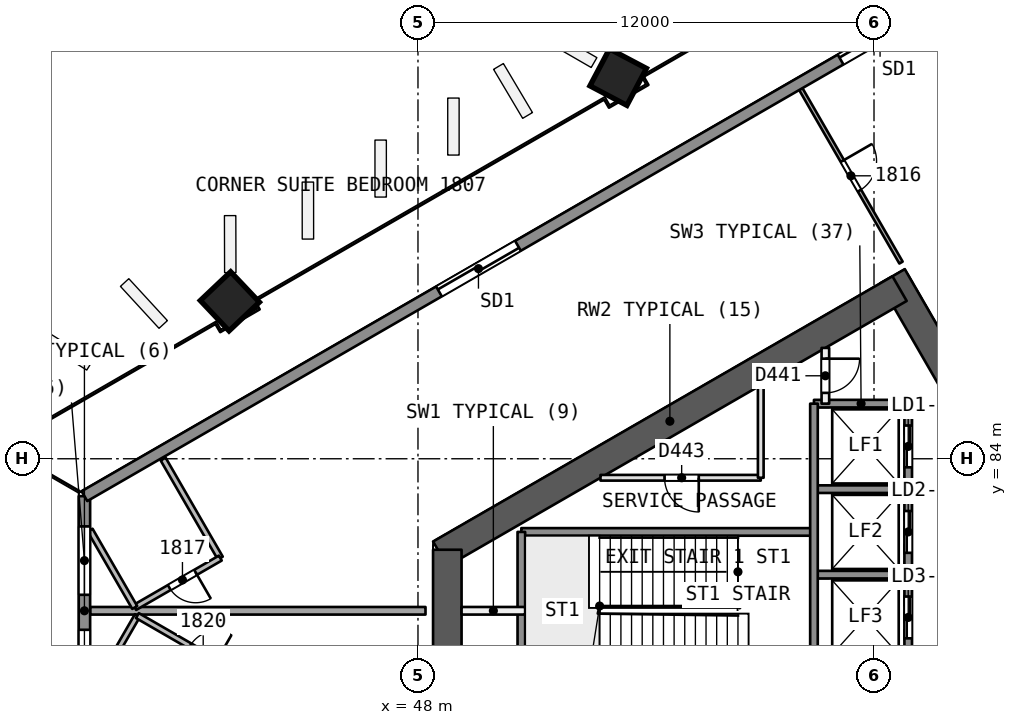
"""IFC4 building model, lengths in metres.
Left out: names, types, materials, properties, quantities, classifications, styles, units other than length and angle.
Written with IfcOpenShell. Run it as: python <this file> out.ifc"""

import sys

from ifc_helpers import new_model, si_unit, direction, frame, frame_2d, origin, origin_2d, place, context, subcontext, project, spatial, rectangle, extrude, element, fill, save


model = new_model("IFC4")
c1 = context("Model", 3, precision=1e-05, world=origin(), true_north=direction((0.0, 1.0)))
c2 = subcontext(c1, "Body", "Model", "MODEL_VIEW")
j1 = project(units=[si_unit("LENGTHUNIT", "METRE"), si_unit("PLANEANGLEUNIT", "RADIAN")], contexts=[c1])
p1 = place(None, origin())
s1 = spatial("IfcSite", under=j1, at=p1, CompositionType="ELEMENT")
p2 = place(p1, origin())
s2 = spatial("IfcBuilding", under=s1, at=p2, CompositionType="ELEMENT")
p3 = place(p2, frame((0.0, 0.0, 79.5)))
s3 = spatial("IfcBuildingStorey", under=s2, at=p3, CompositionType="ELEMENT", Elevation=79.5)
p4 = place(p3, frame((65.567, 80.0, 0.0), z_axis=(0.0, 0.0, 1.0), x_axis=(-0.499988615364, 0.866031976607, 0.0)))
e1 = element("IfcWall", 1, at=p4, inside=s3, PredefinedType="SHEAR", context=c2, shape_type="SweptSolid", body=[
    extrude(rectangle(XDim=10.163, YDim=0.75, at=frame_2d((5.082, 0.0))), origin(), (0.0, 0.0, 1.0), 3.7),
])
p5 = place(p4, frame((0.733, 0.0, 0.0)))
e2 = element("IfcOpeningElement", 2, at=p5, cuts=e1, PredefinedType="OPENING", context=c2, shape_type="SweptSolid", body=[
    extrude(rectangle(XDim=1.2, YDim=2.1, at=frame_2d((0.6, 1.05))), frame((0.0, 0.385, 0.0), z_axis=(0.0, -1.0, 0.0), x_axis=(1.0, 0.0, 0.0)), (0.0, 0.0, 1.0), 0.771),
])
p6 = place(p3, frame((60.673, 88.477, 0.0), z_axis=(0.0, 0.0, 1.0), x_axis=(-0.8660248072, -0.500001033313, 0.0)))
e3 = element("IfcWall", 3, at=p6, inside=s3, PredefinedType="SHEAR", context=c2, shape_type="SweptSolid", body=[
    extrude(rectangle(XDim=13.958, YDim=0.75, at=frame_2d((6.979, 0.0))), origin(), (0.0, 0.0, 1.0), 3.7),
])
p7 = place(p3, frame((48.772, 81.606, 0.0), z_axis=(0.0, 0.0, 1.0), x_axis=(0.0, -1.0, 0.0)))
e4 = element("IfcWall", 4, at=p7, inside=s3, PredefinedType="SHEAR", context=c2, shape_type="SweptSolid", body=[
    extrude(rectangle(XDim=3.429, YDim=0.75, at=frame_2d((1.714, 0.0))), origin(), (0.0, 0.0, 1.0), 3.7),
])
p8 = place(p3, frame((60.673, 71.523, 0.0), z_axis=(0.0, 0.0, 1.0), x_axis=(0.499997052475, 0.866027105532, 0.0)))
e5 = element("IfcWall", 5, at=p8, inside=s3, PredefinedType="SHEAR", context=c2, shape_type="SweptSolid", body=[
    extrude(rectangle(XDim=10.005, YDim=0.75, at=frame_2d((5.002, 0.0))), origin(), (0.0, 0.0, 1.0), 3.7),
])
p9 = place(p8, frame((7.855, 0.0, 0.0)))
e6 = element("IfcOpeningElement", 6, at=p9, cuts=e5, PredefinedType="OPENING", context=c2, shape_type="SweptSolid", body=[
    extrude(rectangle(XDim=1.2, YDim=2.1, at=frame_2d((0.6, 1.05))), frame((0.0, 0.385, 0.0), z_axis=(0.0, -1.0, 0.0), x_axis=(1.0, 0.0, 0.0)), (0.0, 0.0, 1.0), 0.771),
])
p10 = place(p3, frame((53.245, 94.056, 0.0), z_axis=(0.019328516974, -0.012138044789, 0.999739504221), x_axis=(-0.500214302693, 0.865666432488, 0.020181155676)))
e7 = element("IfcColumn", 7, at=p10, inside=s3, PredefinedType="COLUMN", context=c2, shape_type="SweptSolid", body=[
    extrude(rectangle(XDim=1.1, YDim=1.1, at=origin_2d()), origin(), (0.0, 0.0, 1.0), 3.701),
])
p11 = place(p3, frame((43.015, 88.15, 0.0), z_axis=(0.028559101991, -0.006859460986, 0.999568569678), x_axis=(-0.49850746064, 0.866650252321, 0.020190389752)))
e8 = element("IfcColumn", 8, at=p11, inside=s3, PredefinedType="COLUMN", context=c2, shape_type="SweptSolid", body=[
    extrude(rectangle(XDim=1.1, YDim=1.1, at=origin_2d()), origin(), (0.0, 0.0, 1.0), 3.702),
])
p12 = place(p3, frame((58.074, 93.728, 0.0), z_axis=(0.0, 0.0, 1.0), x_axis=(0.499973627007, -0.866040629704, 0.0)))
e9 = element("IfcWall", 9, at=p12, inside=s3, PredefinedType="PARTITIONING", context=c2, shape_type="SweptSolid", body=[
    extrude(rectangle(XDim=5.273, YDim=0.1, at=frame_2d((2.636, 0.0))), origin(), (0.0, 0.0, 1.0), 3.2),
])
p13 = place(p12, frame((2.186, 0.0, 0.0)))
e10 = element("IfcOpeningElement", 10, at=p13, cuts=e9, PredefinedType="OPENING", context=c2, shape_type="SweptSolid", body=[
    extrude(rectangle(XDim=0.9, YDim=2.1, at=frame_2d((0.45, 1.05))), frame((0.0, 0.061, 0.0), z_axis=(0.0, -1.0, 0.0), x_axis=(1.0, 0.0, 0.0)), (0.0, 0.0, 1.0), 0.121),
])
p14 = place(p3, frame((41.294, 83.992, 0.0), z_axis=(0.0, 0.0, 1.0), x_axis=(0.500022102064, -0.866012642776, 0.0)))
e11 = element("IfcWall", 11, at=p14, inside=s3, PredefinedType="PARTITIONING", context=c2, shape_type="SweptSolid", body=[
    extrude(rectangle(XDim=3.009, YDim=0.15, at=frame_2d((1.504, 0.0))), origin(), (0.0, 0.0, 1.0), 3.2),
])
p15 = place(p3, frame((42.798, 81.386, 0.0), z_axis=(0.0, 0.0, 1.0), x_axis=(-0.866021400173, -0.500006934395, 0.0)))
e12 = element("IfcWall", 12, at=p15, inside=s3, PredefinedType="PARTITIONING", context=c2, shape_type="SweptSolid", body=[
    extrude(rectangle(XDim=2.6, YDim=0.15, at=frame_2d((1.3, 0.0))), origin(), (0.0, 0.0, 1.0), 3.2),
])
p16 = place(p15, frame((0.75, 0.0, 0.0)))
e13 = element("IfcOpeningElement", 13, at=p16, cuts=e12, PredefinedType="OPENING", context=c2, shape_type="SweptSolid", body=[
    extrude(rectangle(XDim=0.8, YDim=2.1, at=frame_2d((0.4, 1.05))), frame((0.0, 0.085, 0.0), z_axis=(0.0, -1.0, 0.0), x_axis=(1.0, 0.0, 0.0)), (0.0, 0.0, 1.0), 0.171),
])
p17 = place(p3, frame((40.547, 80.086, 0.0), z_axis=(0.0, 0.0, 1.0), x_axis=(-0.499983284935, 0.866035054017, 0.0)))
e14 = element("IfcWall", 14, at=p17, inside=s3, PredefinedType="PARTITIONING", context=c2, shape_type="SweptSolid", body=[
    extrude(rectangle(XDim=2.35, YDim=0.15, at=frame_2d((1.175, 0.0))), origin(), (0.0, 0.0, 1.0), 3.2),
])
p18 = place(p3, frame((39.372, 80.0, 0.0), z_axis=(0.0, 0.0, 1.0), x_axis=(1.0, 0.0, 0.0)))
e15 = element("IfcWall", 15, at=p18, inside=s3, PredefinedType="PARTITIONING", context=c2, shape_type="SweptSolid", body=[
    extrude(rectangle(XDim=8.826, YDim=0.2, at=frame_2d((4.413, 0.0))), origin(), (0.0, 0.0, 1.0), 3.2),
])
p19 = place(p3, frame((39.372, 77.718, 0.0), z_axis=(0.0, 0.0, 1.0), x_axis=(0.499968694491, 0.866043477274, 0.0)))
e16 = element("IfcWall", 16, at=p19, inside=s3, PredefinedType="PARTITIONING", context=c2, shape_type="SweptSolid", body=[
    extrude(rectangle(XDim=2.489, YDim=0.15, at=frame_2d((1.245, 0.0))), origin(), (0.0, 0.0, 1.0), 3.2),
])
p20 = place(p3, frame((40.616, 79.873, 0.0), z_axis=(0.0, 0.0, 1.0), x_axis=(0.866021400173, -0.500006934395, 0.0)))
e17 = element("IfcWall", 17, at=p20, inside=s3, PredefinedType="PARTITIONING", context=c2, shape_type="SweptSolid", body=[
    extrude(rectangle(XDim=2.6, YDim=0.15, at=frame_2d((1.3, 0.0))), origin(), (0.0, 0.0, 1.0), 3.2),
])
p21 = place(p20, frame((1.6, 0.0, 0.0)))
e18 = element("IfcOpeningElement", 18, at=p21, cuts=e17, PredefinedType="OPENING", context=c2, shape_type="SweptSolid", body=[
    extrude(rectangle(XDim=0.8, YDim=2.1, at=frame_2d((0.4, 1.05))), frame((0.0, 0.085, 0.0), z_axis=(0.0, -1.0, 0.0), x_axis=(1.0, 0.0, 0.0)), (0.0, 0.0, 1.0), 0.171),
])
p22 = place(p3, frame((39.223, 76.984, 0.0), z_axis=(0.0, 0.0, 1.0), x_axis=(0.0, 1.0, 0.0)))
e19 = element("IfcWall", 19, at=p22, inside=s3, PredefinedType="SOLIDWALL", context=c2, shape_type="SweptSolid", body=[
    extrude(rectangle(XDim=6.032, YDim=0.3, at=frame_2d((3.016, 0.0))), origin(), (0.0, 0.0, 1.0), 3.2),
])
p23 = place(p22, frame((3.437, 0.0, 0.9)))
e20 = element("IfcOpeningElement", 20, at=p23, cuts=e19, PredefinedType="OPENING", context=c2, shape_type="SweptSolid", body=[
    extrude(rectangle(XDim=1.8, YDim=1.5, at=frame_2d((0.9, 0.75))), frame((0.0, 0.161, 0.0), z_axis=(0.0, -1.0, 0.0), x_axis=(1.0, 0.0, 0.0)), (0.0, 0.0, 1.0), 0.321),
])
p24 = place(p22, frame((0.716, 0.0, 0.9)))
e21 = element("IfcOpeningElement", 21, at=p24, cuts=e19, PredefinedType="OPENING", context=c2, shape_type="SweptSolid", body=[
    extrude(rectangle(XDim=1.8, YDim=1.5, at=frame_2d((0.9, 0.75))), frame((0.0, 0.161, 0.0), z_axis=(0.0, -1.0, 0.0), x_axis=(1.0, 0.0, 0.0)), (0.0, 0.0, 1.0), 0.321),
])
p25 = place(p3, frame((39.223, 83.016, 0.0), z_axis=(0.0, 0.0, 1.0), x_axis=(0.86602468924, 0.500001237625, 0.0)))
e22 = element("IfcWall", 22, at=p25, inside=s3, PredefinedType="SOLIDWALL", context=c2, shape_type="SweptSolid", body=[
    extrude(rectangle(XDim=58.951, YDim=0.3, at=frame_2d((29.476, 0.0))), origin(), (0.0, 0.0, 1.0), 3.2),
])
p26 = place(p25, frame((28.743, 0.0, 0.0)))
e23 = element("IfcOpeningElement", 23, at=p26, cuts=e22, PredefinedType="OPENING", context=c2, shape_type="SweptSolid", body=[
    extrude(rectangle(XDim=2.4, YDim=2.4, at=frame_2d((1.2, 1.2))), frame((0.0, 0.161, 0.0), z_axis=(0.0, -1.0, 0.0), x_axis=(1.0, 0.0, 0.0)), (0.0, 0.0, 1.0), 0.321),
])
p27 = place(p25, frame((34.043, 0.0, 0.0)))
e24 = element("IfcOpeningElement", 24, at=p27, cuts=e22, PredefinedType="OPENING", context=c2, shape_type="SweptSolid", body=[
    extrude(rectangle(XDim=2.4, YDim=2.4, at=frame_2d((1.2, 1.2))), frame((0.0, 0.161, 0.0), z_axis=(0.0, -1.0, 0.0), x_axis=(1.0, 0.0, 0.0)), (0.0, 0.0, 1.0), 0.321),
])
p28 = place(p25, frame((45.739, 0.0, 0.0)))
e25 = element("IfcOpeningElement", 25, at=p28, cuts=e22, PredefinedType="OPENING", context=c2, shape_type="SweptSolid", body=[
    extrude(rectangle(XDim=2.4, YDim=2.4, at=frame_2d((1.2, 1.2))), frame((0.0, 0.161, 0.0), z_axis=(0.0, -1.0, 0.0), x_axis=(1.0, 0.0, 0.0)), (0.0, 0.0, 1.0), 0.321),
])
p29 = place(p25, frame((22.976, 0.0, 0.0)))
e26 = element("IfcOpeningElement", 26, at=p29, cuts=e22, PredefinedType="OPENING", context=c2, shape_type="SweptSolid", body=[
    extrude(rectangle(XDim=2.4, YDim=2.4, at=frame_2d((1.2, 1.2))), frame((0.0, 0.161, 0.0), z_axis=(0.0, -1.0, 0.0), x_axis=(1.0, 0.0, 0.0)), (0.0, 0.0, 1.0), 0.321),
])
p30 = place(p25, frame((10.773, 0.0, 0.0)))
e27 = element("IfcOpeningElement", 27, at=p30, cuts=e22, PredefinedType="OPENING", context=c2, shape_type="SweptSolid", body=[
    extrude(rectangle(XDim=2.4, YDim=2.4, at=frame_2d((1.2, 1.2))), frame((0.0, 0.161, 0.0), z_axis=(0.0, -1.0, 0.0), x_axis=(1.0, 0.0, 0.0)), (0.0, 0.0, 1.0), 0.321),
])
p31 = place(p3, frame((60.9, 85.45, 0.0), z_axis=(0.0, 0.0, 1.0), x_axis=(-1.0, 0.0, 0.0)))
e28 = element("IfcWall", 28, at=p31, inside=s3, PredefinedType="SOLIDWALL", context=c2, shape_type="SweptSolid", body=[
    extrude(rectangle(XDim=2.48, YDim=0.2, at=frame_2d((1.24, 0.0))), origin(), (0.0, 0.0, 1.0), 3.2),
])
p32 = place(p3, frame((57.02, 83.5, 0.0), z_axis=(0.0, 0.0, 1.0), x_axis=(-1.0, 0.0, 0.0)))
e29 = element("IfcWall", 29, at=p32, inside=s3, PredefinedType="PARTITIONING", context=c2, shape_type="SweptSolid", body=[
    extrude(rectangle(XDim=4.218, YDim=0.15, at=frame_2d((2.109, 0.0))), origin(), (0.0, 0.0, 1.0), 3.2),
])
p33 = place(p32, frame((1.631, 0.0, 0.0)))
e30 = element("IfcOpeningElement", 30, at=p33, cuts=e29, PredefinedType="OPENING", context=c2, shape_type="SweptSolid", body=[
    extrude(rectangle(XDim=0.9, YDim=2.1, at=frame_2d((0.45, 1.05))), frame((0.0, 0.085, 0.0), z_axis=(0.0, -1.0, 0.0), x_axis=(1.0, 0.0, 0.0)), (0.0, 0.0, 1.0), 0.171),
])
p34 = place(p3, frame((60.9, 83.2, 0.0), z_axis=(0.0, 0.0, 1.0), x_axis=(-1.0, 0.0, 0.0)))
e31 = element("IfcWall", 31, at=p34, inside=s3, PredefinedType="SOLIDWALL", context=c2, shape_type="SweptSolid", body=[
    extrude(rectangle(XDim=2.48, YDim=0.2, at=frame_2d((1.24, 0.0))), origin(), (0.0, 0.0, 1.0), 3.2),
])
p35 = place(p3, frame((58.42, 82.075, 0.0), z_axis=(0.0, 0.0, 1.0), x_axis=(-1.0, 0.0, 0.0)))
e32 = element("IfcWall", 32, at=p35, inside=s3, PredefinedType="SOLIDWALL", context=c2, shape_type="SweptSolid", body=[
    extrude(rectangle(XDim=7.7, YDim=0.2, at=frame_2d((3.85, 0.0))), origin(), (0.0, 0.0, 1.0), 3.2),
])
p36 = place(p3, frame((60.9, 80.95, 0.0), z_axis=(0.0, 0.0, 1.0), x_axis=(-1.0, 0.0, 0.0)))
e33 = element("IfcWall", 33, at=p36, inside=s3, PredefinedType="SOLIDWALL", context=c2, shape_type="SweptSolid", body=[
    extrude(rectangle(XDim=2.48, YDim=0.2, at=frame_2d((1.24, 0.0))), origin(), (0.0, 0.0, 1.0), 3.2),
])
p37 = place(p3, frame((50.82, 80.0, 0.0), z_axis=(0.0, 0.0, 1.0), x_axis=(-1.0, 0.0, 0.0)))
e34 = element("IfcWall", 34, at=p37, inside=s3, PredefinedType="PARTITIONING", context=c2, shape_type="SweptSolid", body=[
    extrude(rectangle(XDim=1.673, YDim=0.2, at=frame_2d((0.836, 0.0))), origin(), (0.0, 0.0, 1.0), 3.2),
])
p38 = place(p3, frame((60.9, 85.45, 0.0), z_axis=(0.0, 0.0, 1.0), x_axis=(0.0, -1.0, 0.0)))
e35 = element("IfcWall", 35, at=p38, inside=s3, PredefinedType="SOLIDWALL", context=c2, shape_type="SweptSolid", body=[
    extrude(rectangle(XDim=10.9, YDim=0.2, at=frame_2d((5.45, 0.0))), origin(), (0.0, 0.0, 1.0), 3.2),
])
p39 = place(p38, frame((0.575, 0.0, 0.0)))
e36 = element("IfcOpeningElement", 36, at=p39, cuts=e35, PredefinedType="OPENING", context=c2, shape_type="SweptSolid", body=[
    extrude(rectangle(XDim=1.1, YDim=2.1, at=frame_2d((0.55, 1.05))), frame((0.0, 0.11, 0.0), z_axis=(0.0, -1.0, 0.0), x_axis=(1.0, 0.0, 0.0)), (0.0, 0.0, 1.0), 0.221),
])
p40 = place(p38, frame((2.825, 0.0, 0.0)))
e37 = element("IfcOpeningElement", 37, at=p40, cuts=e35, PredefinedType="OPENING", context=c2, shape_type="SweptSolid", body=[
    extrude(rectangle(XDim=1.1, YDim=2.1, at=frame_2d((0.55, 1.05))), frame((0.0, 0.11, 0.0), z_axis=(0.0, -1.0, 0.0), x_axis=(1.0, 0.0, 0.0)), (0.0, 0.0, 1.0), 0.221),
])
p41 = place(p38, frame((5.075, 0.0, 0.0)))
e38 = element("IfcOpeningElement", 38, at=p41, cuts=e35, PredefinedType="OPENING", context=c2, shape_type="SweptSolid", body=[
    extrude(rectangle(XDim=1.1, YDim=2.1, at=frame_2d((0.55, 1.05))), frame((0.0, 0.11, 0.0), z_axis=(0.0, -1.0, 0.0), x_axis=(1.0, 0.0, 0.0)), (0.0, 0.0, 1.0), 0.221),
])
p42 = place(p38, frame((7.325, 0.0, 0.0)))
e39 = element("IfcOpeningElement", 39, at=p42, cuts=e35, PredefinedType="OPENING", context=c2, shape_type="SweptSolid", body=[
    extrude(rectangle(XDim=1.1, YDim=2.1, at=frame_2d((0.55, 1.05))), frame((0.0, 0.11, 0.0), z_axis=(0.0, -1.0, 0.0), x_axis=(1.0, 0.0, 0.0)), (0.0, 0.0, 1.0), 0.221),
])
p43 = place(p3, frame((58.72, 86.917, 0.0), z_axis=(0.0, 0.0, 1.0), x_axis=(0.0, -1.0, 0.0)))
e40 = element("IfcWall", 40, at=p43, inside=s3, PredefinedType="PARTITIONING", context=c2, shape_type="SweptSolid", body=[
    extrude(rectangle(XDim=1.467, YDim=0.2, at=frame_2d((0.733, 0.0))), origin(), (0.0, 0.0, 1.0), 3.2),
])
p44 = place(p43, frame((0.283, 0.0, 0.0)))
e41 = element("IfcOpeningElement", 41, at=p44, cuts=e40, PredefinedType="OPENING", context=c2, shape_type="SweptSolid", body=[
    extrude(rectangle(XDim=0.9, YDim=2.1, at=frame_2d((0.45, 1.05))), frame((0.0, 0.11, 0.0), z_axis=(0.0, -1.0, 0.0), x_axis=(1.0, 0.0, 0.0)), (0.0, 0.0, 1.0), 0.221),
])
p45 = place(p3, frame((58.42, 85.45, 0.0), z_axis=(0.0, 0.0, 1.0), x_axis=(0.0, -1.0, 0.0)))
e42 = element("IfcWall", 42, at=p45, inside=s3, PredefinedType="SOLIDWALL", context=c2, shape_type="SweptSolid", body=[
    extrude(rectangle(XDim=9.0, YDim=0.2, at=frame_2d((4.5, 0.0))), origin(), (0.0, 0.0, 1.0), 3.2),
])
p46 = place(p3, frame((57.02, 85.935, 0.0), z_axis=(0.0, 0.0, 1.0), x_axis=(0.0, -1.0, 0.0)))
e43 = element("IfcWall", 43, at=p46, inside=s3, PredefinedType="PARTITIONING", context=c2, shape_type="SweptSolid", body=[
    extrude(rectangle(XDim=2.435, YDim=0.15, at=frame_2d((1.218, 0.0))), origin(), (0.0, 0.0, 1.0), 3.2),
])
p47 = place(p3, frame((50.72, 82.075, 0.0), z_axis=(0.0, 0.0, 1.0), x_axis=(0.0, -1.0, 0.0)))
e44 = element("IfcWall", 44, at=p47, inside=s3, PredefinedType="SOLIDWALL", context=c2, shape_type="SweptSolid", body=[
    extrude(rectangle(XDim=4.15, YDim=0.2, at=frame_2d((2.075, 0.0))), origin(), (0.0, 0.0, 1.0), 3.2),
])
p48 = place(p13, origin())
e45 = element("IfcDoor", 45, at=p48, inside=s3, OperationType="SINGLE_SWING_LEFT", PredefinedType="NOTDEFINED", context=c2, shape_type="SweptSolid", body=[
    extrude(rectangle(XDim=0.9, YDim=2.1, at=frame_2d((0.45, 1.05))), frame((0.0, 0.025, 0.0), z_axis=(0.0, -1.0, 0.0), x_axis=(1.0, 0.0, 0.0)), (0.0, 0.0, 1.0), 0.05),
])
fill(e10, e45)
p49 = place(p16, origin())
e46 = element("IfcDoor", 46, at=p49, inside=s3, OperationType="SINGLE_SWING_LEFT", PredefinedType="NOTDEFINED", context=c2, shape_type="SweptSolid", body=[
    extrude(rectangle(XDim=0.8, YDim=2.1, at=frame_2d((0.4, 1.05))), frame((0.0, 0.025, 0.0), z_axis=(0.0, -1.0, 0.0), x_axis=(1.0, 0.0, 0.0)), (0.0, 0.0, 1.0), 0.05),
])
fill(e13, e46)
p50 = place(p23, origin())
e47 = element("IfcWindow", 47, at=p50, inside=s3, PartitioningType="SINGLE_PANEL", PredefinedType="WINDOW", context=c2, shape_type="SweptSolid", body=[
    extrude(rectangle(XDim=1.8, YDim=1.5, at=frame_2d((0.9, 0.75))), frame((0.0, 0.03, 0.0), z_axis=(0.0, -1.0, 0.0), x_axis=(1.0, 0.0, 0.0)), (0.0, 0.0, 1.0), 0.06),
])
fill(e20, e47)
p51 = place(p24, origin())
e48 = element("IfcWindow", 48, at=p51, inside=s3, PartitioningType="SINGLE_PANEL", PredefinedType="WINDOW", context=c2, shape_type="SweptSolid", body=[
    extrude(rectangle(XDim=1.8, YDim=1.5, at=frame_2d((0.9, 0.75))), frame((0.0, 0.03, 0.0), z_axis=(0.0, -1.0, 0.0), x_axis=(1.0, 0.0, 0.0)), (0.0, 0.0, 1.0), 0.06),
])
fill(e21, e48)
p52 = place(p29, origin())
e49 = element("IfcDoor", 49, at=p52, inside=s3, OperationType="SLIDING_TO_RIGHT", PredefinedType="NOTDEFINED", context=c2, shape_type="SweptSolid", body=[
    extrude(rectangle(XDim=2.4, YDim=2.4, at=frame_2d((1.2, 1.2))), frame((0.0, 0.025, 0.0), z_axis=(0.0, -1.0, 0.0), x_axis=(1.0, 0.0, 0.0)), (0.0, 0.0, 1.0), 0.05),
])
fill(e26, e49)
p53 = place(p30, origin())
e50 = element("IfcDoor", 50, at=p53, inside=s3, OperationType="SLIDING_TO_LEFT", PredefinedType="NOTDEFINED", context=c2, shape_type="SweptSolid", body=[
    extrude(rectangle(XDim=2.4, YDim=2.4, at=frame_2d((1.2, 1.2))), frame((0.0, 0.025, 0.0), z_axis=(0.0, -1.0, 0.0), x_axis=(1.0, 0.0, 0.0)), (0.0, 0.0, 1.0), 0.05),
])
fill(e27, e50)
p54 = place(p39, origin())
e51 = element("IfcDoor", 51, at=p54, inside=s3, OperationType="SLIDING_TO_RIGHT", PredefinedType="NOTDEFINED", context=c2, shape_type="SweptSolid", body=[
    extrude(rectangle(XDim=1.1, YDim=2.1, at=frame_2d((0.55, 1.05))), frame((0.0, 0.025, 0.0), z_axis=(0.0, -1.0, 0.0), x_axis=(1.0, 0.0, 0.0)), (0.0, 0.0, 1.0), 0.05),
])
fill(e36, e51)
p55 = place(p40, origin())
e52 = element("IfcDoor", 52, at=p55, inside=s3, OperationType="SLIDING_TO_LEFT", PredefinedType="NOTDEFINED", context=c2, shape_type="SweptSolid", body=[
    extrude(rectangle(XDim=1.1, YDim=2.1, at=frame_2d((0.55, 1.05))), frame((0.0, 0.025, 0.0), z_axis=(0.0, -1.0, 0.0), x_axis=(1.0, 0.0, 0.0)), (0.0, 0.0, 1.0), 0.05),
])
fill(e37, e52)
p56 = place(p41, origin())
e53 = element("IfcDoor", 53, at=p56, inside=s3, OperationType="SLIDING_TO_RIGHT", PredefinedType="NOTDEFINED", context=c2, shape_type="SweptSolid", body=[
    extrude(rectangle(XDim=1.1, YDim=2.1, at=frame_2d((0.55, 1.05))), frame((0.0, 0.025, 0.0), z_axis=(0.0, -1.0, 0.0), x_axis=(1.0, 0.0, 0.0)), (0.0, 0.0, 1.0), 0.05),
])
fill(e38, e53)
p57 = place(p44, origin())
e54 = element("IfcDoor", 54, at=p57, inside=s3, OperationType="SINGLE_SWING_LEFT", PredefinedType="NOTDEFINED", context=c2, shape_type="SweptSolid", body=[
    extrude(rectangle(XDim=0.9, YDim=2.1, at=frame_2d((0.45, 1.05))), frame((0.0, 0.025, 0.0), z_axis=(0.0, -1.0, 0.0), x_axis=(1.0, 0.0, 0.0)), (0.0, 0.0, 1.0), 0.05),
])
fill(e41, e54)
p58 = place(p33, origin())
e55 = element("IfcDoor", 55, at=p58, inside=s3, OperationType="SINGLE_SWING_LEFT", PredefinedType="NOTDEFINED", context=c2, shape_type="SweptSolid", body=[
    extrude(rectangle(XDim=0.9, YDim=2.1, at=frame_2d((0.45, 1.05))), frame((0.0, 0.025, 0.0), z_axis=(0.0, -1.0, 0.0), x_axis=(1.0, 0.0, 0.0)), (0.0, 0.0, 1.0), 0.05),
])
fill(e30, e55)
save(model, sys.argv[1])
